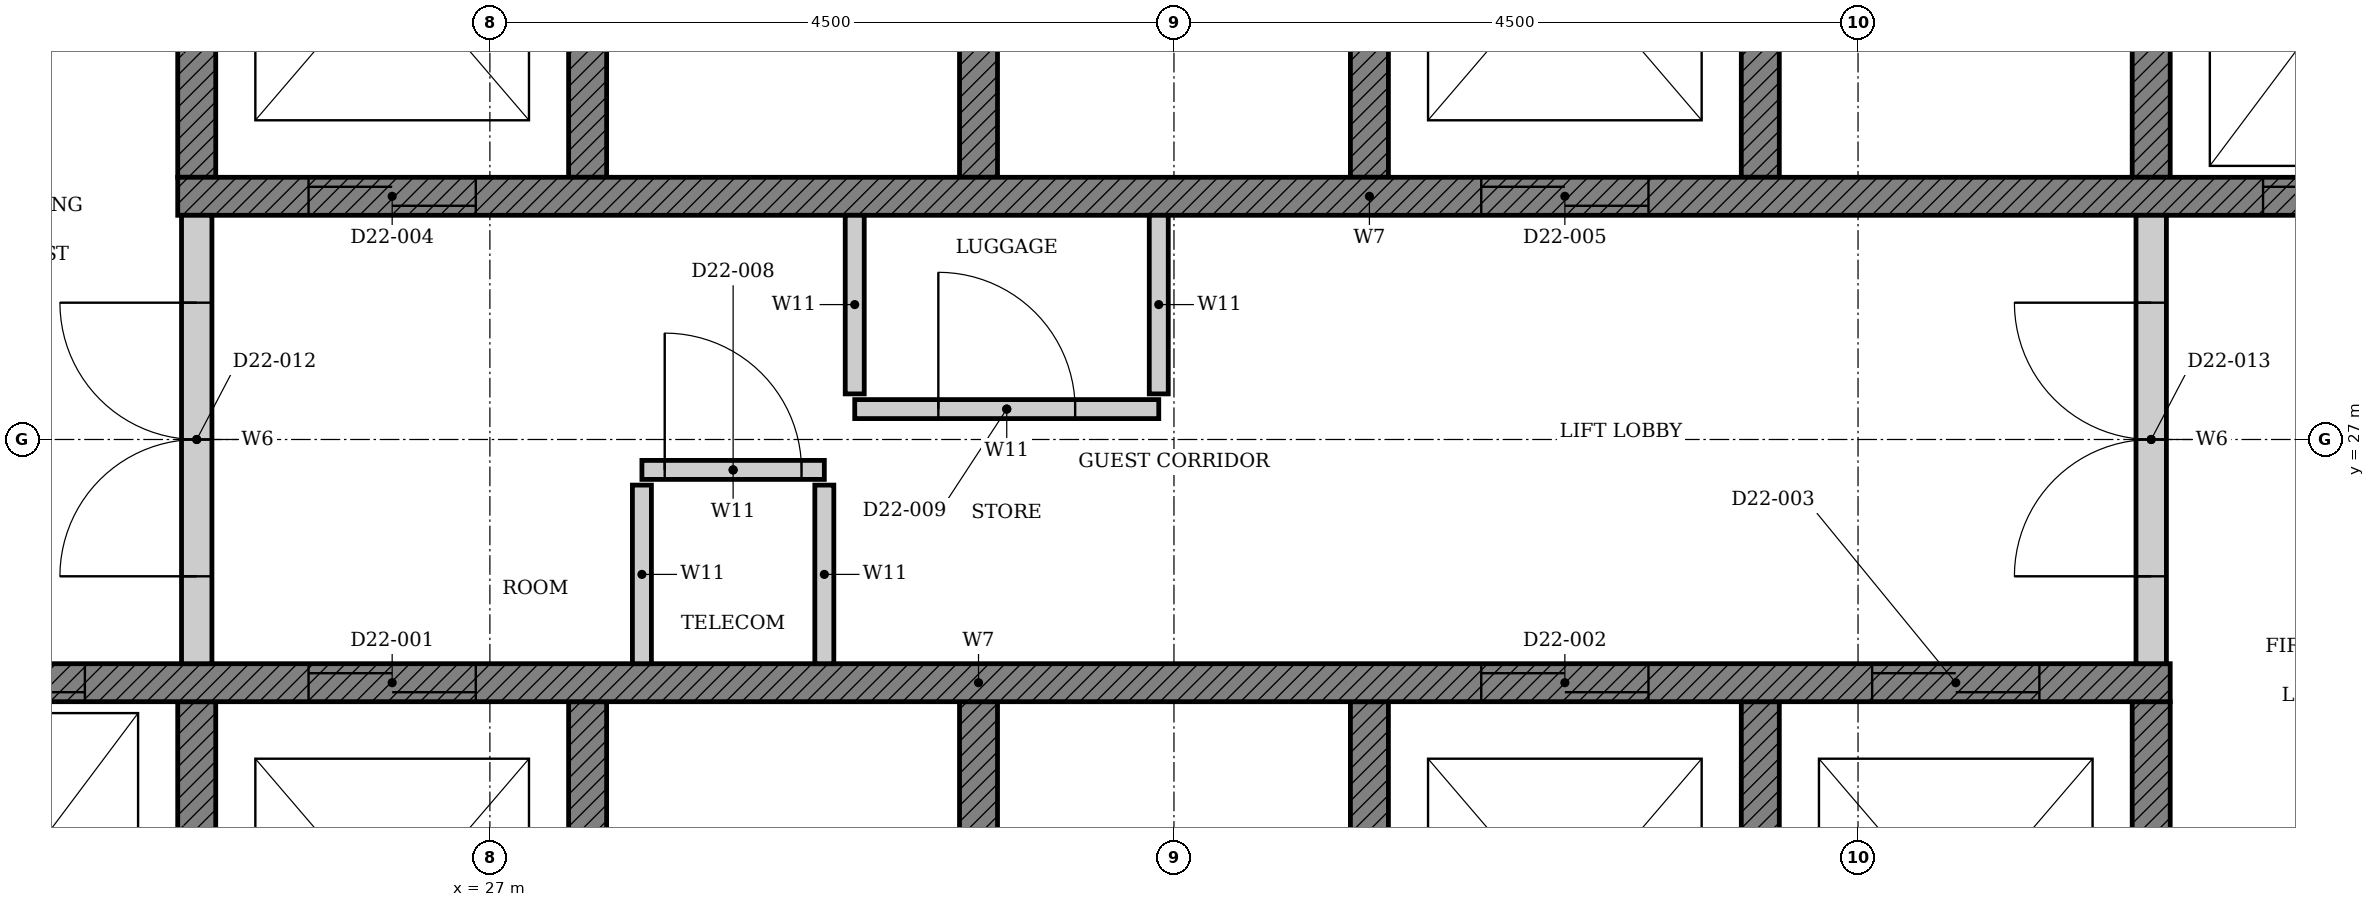
"""IFC4 building model, lengths in metres.
Left out: names, types, materials, properties, quantities, classifications, styles, units other than length and angle.
Written with IfcOpenShell. Run it as: python <this file> out.ifc"""

import sys

from ifc_helpers import new_model, si_unit, direction, frame, frame_2d, origin, place, context, subcontext, project, spatial, polyline, rectangle, outline, extrude, element, fill, save


model = new_model("IFC4")
c1 = context("Model", 3, precision=1e-05, world=origin(), true_north=direction((0.0, 1.0)))
c2 = subcontext(c1, "Body", "Model", "MODEL_VIEW")
j1 = project(units=[si_unit("LENGTHUNIT", "METRE"), si_unit("PLANEANGLEUNIT", "RADIAN")], contexts=[c1])
p1 = place(None, origin())
s1 = spatial("IfcSite", under=j1, at=p1, CompositionType="ELEMENT")
p2 = place(p1, origin())
s2 = spatial("IfcBuilding", under=s1, at=p2, CompositionType="ELEMENT")
p3 = place(p2, frame((0.0, 0.0, 92.4)))
s3 = spatial("IfcBuildingStorey", under=s2, at=p3, CompositionType="ELEMENT", Elevation=92.4)
p4 = place(p3, origin())
e1 = element("IfcWall", 1, at=p4, inside=s3, PredefinedType="SHEAR", context=c2, shape_type="SweptSolid", body=[
    extrude(outline(polyline([(22.375, 22.35), (38.053, 22.35), (38.053, 25.275), (37.803, 25.275), (37.803, 22.65), (35.482, 22.65), (35.482, 25.275), (35.232, 25.275), (35.232, 22.65), (32.911, 22.65), (32.911, 25.275), (32.661, 25.275), (32.661, 22.65), (30.339, 22.65), (30.339, 25.275), (30.089, 25.275), (30.089, 22.65), (27.768, 22.65), (27.768, 25.275), (27.518, 25.275), (27.518, 22.65), (25.197, 22.65), (25.197, 25.275), (24.947, 25.275), (24.947, 22.65), (22.625, 22.65), (22.625, 25.275), (22.375, 25.275), (22.375, 22.35)])), origin(), (0.0, 0.0, 1.0), 3.2),
])
p5 = place(p3, origin())
e2 = element("IfcWall", 2, at=p5, inside=s3, PredefinedType="SHEAR", context=c2, shape_type="SweptSolid", body=[
    extrude(outline(polyline([(24.947, 28.725), (25.197, 28.725), (25.197, 31.35), (27.518, 31.35), (27.518, 28.725), (27.768, 28.725), (27.768, 31.35), (30.089, 31.35), (30.089, 28.725), (30.339, 28.725), (30.339, 31.35), (32.661, 31.35), (32.661, 28.725), (32.911, 28.725), (32.911, 31.35), (35.232, 31.35), (35.232, 28.725), (35.482, 28.725), (35.482, 31.35), (37.803, 31.35), (37.803, 28.725), (38.053, 28.725), (38.053, 31.35), (40.375, 31.35), (40.375, 28.725), (40.625, 28.725), (40.625, 31.65), (24.947, 31.65), (24.947, 28.725)])), origin(), (0.0, 0.0, 1.0), 3.2),
])
p6 = place(p3, frame((22.375, 25.4, 0.0), z_axis=(0.0, 0.0, 1.0), x_axis=(1.0, 0.0, 0.0)))
e3 = element("IfcWall", 3, at=p6, inside=s3, PredefinedType="SHEAR", context=c2, shape_type="SweptSolid", body=[
    extrude(rectangle(XDim=15.678, YDim=0.25, at=frame_2d((7.839, 0.0))), origin(), (0.0, 0.0, 1.0), 3.2),
])
p7 = place(p6, frame((3.432, 0.0, 0.0)))
e4 = element("IfcOpeningElement", 4, at=p7, cuts=e3, PredefinedType="OPENING", context=c2, shape_type="SweptSolid", body=[
    extrude(rectangle(XDim=1.1, YDim=2.1, at=frame_2d((0.55, 1.05))), frame((0.0, 0.135, 0.0), z_axis=(0.0, -1.0, 0.0), x_axis=(1.0, 0.0, 0.0)), (0.0, 0.0, 1.0), 0.27),
])
p8 = place(p6, frame((11.146, 0.0, 0.0)))
e5 = element("IfcOpeningElement", 5, at=p8, cuts=e3, PredefinedType="OPENING", context=c2, shape_type="SweptSolid", body=[
    extrude(rectangle(XDim=1.1, YDim=2.1, at=frame_2d((0.55, 1.05))), frame((0.0, 0.135, 0.0), z_axis=(0.0, -1.0, 0.0), x_axis=(1.0, 0.0, 0.0)), (0.0, 0.0, 1.0), 0.27),
])
p9 = place(p6, frame((13.718, 0.0, 0.0)))
e6 = element("IfcOpeningElement", 6, at=p9, cuts=e3, PredefinedType="OPENING", context=c2, shape_type="SweptSolid", body=[
    extrude(rectangle(XDim=1.1, YDim=2.1, at=frame_2d((0.55, 1.05))), frame((0.0, 0.135, 0.0), z_axis=(0.0, -1.0, 0.0), x_axis=(1.0, 0.0, 0.0)), (0.0, 0.0, 1.0), 0.27),
])
p10 = place(p6, frame((0.861, 0.0, 0.0)))
e7 = element("IfcOpeningElement", 7, at=p10, cuts=e3, PredefinedType="OPENING", context=c2, shape_type="SweptSolid", body=[
    extrude(rectangle(XDim=1.1, YDim=2.1, at=frame_2d((0.55, 1.05))), frame((0.0, 0.135, 0.0), z_axis=(0.0, -1.0, 0.0), x_axis=(1.0, 0.0, 0.0)), (0.0, 0.0, 1.0), 0.27),
])
p11 = place(p3, frame((24.947, 28.6, 0.0), z_axis=(0.0, 0.0, 1.0), x_axis=(1.0, 0.0, 0.0)))
e8 = element("IfcWall", 8, at=p11, inside=s3, PredefinedType="SHEAR", context=c2, shape_type="SweptSolid", body=[
    extrude(rectangle(XDim=15.678, YDim=0.25, at=frame_2d((7.839, 0.0))), origin(), (0.0, 0.0, 1.0), 3.2),
])
p12 = place(p11, frame((0.861, 0.0, 0.0)))
e9 = element("IfcOpeningElement", 9, at=p12, cuts=e8, PredefinedType="OPENING", context=c2, shape_type="SweptSolid", body=[
    extrude(rectangle(XDim=1.1, YDim=2.1, at=frame_2d((0.55, 1.05))), frame((0.0, 0.135, 0.0), z_axis=(0.0, -1.0, 0.0), x_axis=(1.0, 0.0, 0.0)), (0.0, 0.0, 1.0), 0.27),
])
p13 = place(p11, frame((8.575, 0.0, 0.0)))
e10 = element("IfcOpeningElement", 10, at=p13, cuts=e8, PredefinedType="OPENING", context=c2, shape_type="SweptSolid", body=[
    extrude(rectangle(XDim=1.1, YDim=2.1, at=frame_2d((0.55, 1.05))), frame((0.0, 0.135, 0.0), z_axis=(0.0, -1.0, 0.0), x_axis=(1.0, 0.0, 0.0)), (0.0, 0.0, 1.0), 0.27),
])
p14 = place(p11, frame((13.718, 0.0, 0.0)))
e11 = element("IfcOpeningElement", 11, at=p14, cuts=e8, PredefinedType="OPENING", context=c2, shape_type="SweptSolid", body=[
    extrude(rectangle(XDim=1.1, YDim=2.1, at=frame_2d((0.55, 1.05))), frame((0.0, 0.135, 0.0), z_axis=(0.0, -1.0, 0.0), x_axis=(1.0, 0.0, 0.0)), (0.0, 0.0, 1.0), 0.27),
])
p15 = place(p3, frame((28.0, 26.8, 0.0), z_axis=(0.0, 0.0, 1.0), x_axis=(1.0, 0.0, 0.0)))
e12 = element("IfcWall", 12, at=p15, inside=s3, PredefinedType="PARTITIONING", context=c2, shape_type="SweptSolid", body=[
    extrude(rectangle(XDim=1.2, YDim=0.125, at=frame_2d((0.6, 0.0))), origin(), (0.0, 0.0, 1.0), 3.2),
])
p16 = place(p15, frame((0.15, 0.0, 0.0)))
e13 = element("IfcOpeningElement", 13, at=p16, cuts=e12, PredefinedType="OPENING", context=c2, shape_type="SweptSolid", body=[
    extrude(rectangle(XDim=0.9, YDim=2.1, at=frame_2d((0.45, 1.05))), frame((0.0, 0.073, 0.0), z_axis=(0.0, -1.0, 0.0), x_axis=(1.0, 0.0, 0.0)), (0.0, 0.0, 1.0), 0.145),
])
for number, where, z_axis, x_axis in (
    (14, (28.0, 25.525, 0.0), (0.0, 0.0, 1.0), (0.0, 1.0, 0.0)),
    (15, (29.2, 25.525, 0.0), (0.0, 0.0, 1.0), (0.0, 1.0, 0.0)),
):
    element("IfcWall", number, at=place(p3, frame(where, z_axis=z_axis, x_axis=x_axis)), inside=s3, PredefinedType="PARTITIONING", context=c2, shape_type="SweptSolid", body=[
        extrude(rectangle(XDim=1.175, YDim=0.125, at=frame_2d((0.587, 0.0))), origin(), (0.0, 0.0, 1.0), 3.2),
    ])
p17 = place(p3, frame((29.4, 27.2, 0.0), z_axis=(0.0, 0.0, 1.0), x_axis=(1.0, 0.0, 0.0)))
e16 = element("IfcWall", 16, at=p17, inside=s3, PredefinedType="PARTITIONING", context=c2, shape_type="SweptSolid", body=[
    extrude(rectangle(XDim=2.0, YDim=0.125, at=frame_2d((1.0, 0.0))), origin(), (0.0, 0.0, 1.0), 3.2),
])
p18 = place(p17, frame((0.55, 0.0, 0.0)))
e17 = element("IfcOpeningElement", 17, at=p18, cuts=e16, PredefinedType="OPENING", context=c2, shape_type="SweptSolid", body=[
    extrude(rectangle(XDim=0.9, YDim=2.1, at=frame_2d((0.45, 1.05))), frame((0.0, 0.073, 0.0), z_axis=(0.0, -1.0, 0.0), x_axis=(1.0, 0.0, 0.0)), (0.0, 0.0, 1.0), 0.145),
])
for number, where, z_axis, x_axis in (
    (18, (29.4, 28.475, 0.0), (0.0, 0.0, 1.0), (0.0, -1.0, 0.0)),
    (19, (31.4, 28.475, 0.0), (0.0, 0.0, 1.0), (0.0, -1.0, 0.0)),
):
    element("IfcWall", number, at=place(p3, frame(where, z_axis=z_axis, x_axis=x_axis)), inside=s3, PredefinedType="PARTITIONING", context=c2, shape_type="SweptSolid", body=[
        extrude(rectangle(XDim=1.175, YDim=0.125, at=frame_2d((0.587, 0.0))), origin(), (0.0, 0.0, 1.0), 3.2),
    ])
p19 = place(p3, frame((25.072, 25.525, 0.0), z_axis=(0.0, 0.0, 1.0), x_axis=(0.0, 1.0, 0.0)))
e20 = element("IfcWall", 20, at=p19, inside=s3, PredefinedType="PARTITIONING", context=c2, shape_type="SweptSolid", body=[
    extrude(rectangle(XDim=2.95, YDim=0.2, at=frame_2d((1.475, 0.0))), origin(), (0.0, 0.0, 1.0), 3.2),
])
p20 = place(p19, frame((0.575, 0.0, 0.0)))
e21 = element("IfcOpeningElement", 21, at=p20, cuts=e20, PredefinedType="OPENING", context=c2, shape_type="SweptSolid", body=[
    extrude(rectangle(XDim=1.8, YDim=2.1, at=frame_2d((0.9, 1.05))), frame((0.0, 0.11, 0.0), z_axis=(0.0, -1.0, 0.0), x_axis=(1.0, 0.0, 0.0)), (0.0, 0.0, 1.0), 0.22),
])
p21 = place(p3, frame((37.928, 25.525, 0.0), z_axis=(0.0, 0.0, 1.0), x_axis=(0.0, 1.0, 0.0)))
e22 = element("IfcWall", 22, at=p21, inside=s3, PredefinedType="PARTITIONING", context=c2, shape_type="SweptSolid", body=[
    extrude(rectangle(XDim=2.95, YDim=0.2, at=frame_2d((1.475, 0.0))), origin(), (0.0, 0.0, 1.0), 3.2),
])
p22 = place(p21, frame((0.575, 0.0, 0.0)))
e23 = element("IfcOpeningElement", 23, at=p22, cuts=e22, PredefinedType="OPENING", context=c2, shape_type="SweptSolid", body=[
    extrude(rectangle(XDim=1.8, YDim=2.1, at=frame_2d((0.9, 1.05))), frame((0.0, 0.11, 0.0), z_axis=(0.0, -1.0, 0.0), x_axis=(1.0, 0.0, 0.0)), (0.0, 0.0, 1.0), 0.22),
])
p23 = place(p7, origin())
e24 = element("IfcDoor", 24, at=p23, inside=s3, OperationType="DOUBLE_DOOR_SLIDING", PredefinedType="DOOR", context=c2, shape_type="SweptSolid", body=[
    extrude(rectangle(XDim=1.1, YDim=2.1, at=frame_2d((0.55, 1.05))), frame((0.0, 0.025, 0.0), z_axis=(0.0, -1.0, 0.0), x_axis=(1.0, 0.0, 0.0)), (0.0, 0.0, 1.0), 0.05),
])
fill(e4, e24)
p24 = place(p8, origin())
e25 = element("IfcDoor", 25, at=p24, inside=s3, OperationType="DOUBLE_DOOR_SLIDING", PredefinedType="DOOR", context=c2, shape_type="SweptSolid", body=[
    extrude(rectangle(XDim=1.1, YDim=2.1, at=frame_2d((0.55, 1.05))), frame((0.0, 0.025, 0.0), z_axis=(0.0, -1.0, 0.0), x_axis=(1.0, 0.0, 0.0)), (0.0, 0.0, 1.0), 0.05),
])
fill(e5, e25)
p25 = place(p9, origin())
e26 = element("IfcDoor", 26, at=p25, inside=s3, OperationType="DOUBLE_DOOR_SLIDING", PredefinedType="DOOR", context=c2, shape_type="SweptSolid", body=[
    extrude(rectangle(XDim=1.1, YDim=2.1, at=frame_2d((0.55, 1.05))), frame((0.0, 0.025, 0.0), z_axis=(0.0, -1.0, 0.0), x_axis=(1.0, 0.0, 0.0)), (0.0, 0.0, 1.0), 0.05),
])
fill(e6, e26)
p26 = place(p12, origin())
e27 = element("IfcDoor", 27, at=p26, inside=s3, OperationType="DOUBLE_DOOR_SLIDING", PredefinedType="DOOR", context=c2, shape_type="SweptSolid", body=[
    extrude(rectangle(XDim=1.1, YDim=2.1, at=frame_2d((0.55, 1.05))), frame((0.0, 0.025, 0.0), z_axis=(0.0, -1.0, 0.0), x_axis=(1.0, 0.0, 0.0)), (0.0, 0.0, 1.0), 0.05),
])
fill(e9, e27)
p27 = place(p13, origin())
e28 = element("IfcDoor", 28, at=p27, inside=s3, OperationType="DOUBLE_DOOR_SLIDING", PredefinedType="DOOR", context=c2, shape_type="SweptSolid", body=[
    extrude(rectangle(XDim=1.1, YDim=2.1, at=frame_2d((0.55, 1.05))), frame((0.0, 0.025, 0.0), z_axis=(0.0, -1.0, 0.0), x_axis=(1.0, 0.0, 0.0)), (0.0, 0.0, 1.0), 0.05),
])
fill(e10, e28)
p28 = place(p10, origin())
e29 = element("IfcDoor", 29, at=p28, inside=s3, OperationType="DOUBLE_DOOR_SLIDING", PredefinedType="DOOR", context=c2, shape_type="SweptSolid", body=[
    extrude(rectangle(XDim=1.1, YDim=2.1, at=frame_2d((0.55, 1.05))), frame((0.0, 0.025, 0.0), z_axis=(0.0, -1.0, 0.0), x_axis=(1.0, 0.0, 0.0)), (0.0, 0.0, 1.0), 0.05),
])
fill(e7, e29)
p29 = place(p14, origin())
e30 = element("IfcDoor", 30, at=p29, inside=s3, OperationType="DOUBLE_DOOR_SLIDING", PredefinedType="DOOR", context=c2, shape_type="SweptSolid", body=[
    extrude(rectangle(XDim=1.1, YDim=2.1, at=frame_2d((0.55, 1.05))), frame((0.0, 0.025, 0.0), z_axis=(0.0, -1.0, 0.0), x_axis=(1.0, 0.0, 0.0)), (0.0, 0.0, 1.0), 0.05),
])
fill(e11, e30)
p30 = place(p16, origin())
e31 = element("IfcDoor", 31, at=p30, inside=s3, OperationType="SINGLE_SWING_LEFT", PredefinedType="DOOR", context=c2, shape_type="SweptSolid", body=[
    extrude(rectangle(XDim=0.9, YDim=2.1, at=frame_2d((0.45, 1.05))), frame((0.0, 0.025, 0.0), z_axis=(0.0, -1.0, 0.0), x_axis=(1.0, 0.0, 0.0)), (0.0, 0.0, 1.0), 0.05),
])
fill(e13, e31)
p31 = place(p18, origin())
e32 = element("IfcDoor", 32, at=p31, inside=s3, OperationType="SINGLE_SWING_LEFT", PredefinedType="DOOR", context=c2, shape_type="SweptSolid", body=[
    extrude(rectangle(XDim=0.9, YDim=2.1, at=frame_2d((0.45, 1.05))), frame((0.0, 0.025, 0.0), z_axis=(0.0, -1.0, 0.0), x_axis=(1.0, 0.0, 0.0)), (0.0, 0.0, 1.0), 0.05),
])
fill(e17, e32)
p32 = place(p20, origin())
e33 = element("IfcDoor", 33, at=p32, inside=s3, OperationType="DOUBLE_DOOR_SINGLE_SWING", PredefinedType="DOOR", context=c2, shape_type="SweptSolid", body=[
    extrude(rectangle(XDim=1.8, YDim=2.1, at=frame_2d((0.9, 1.05))), frame((0.0, 0.025, 0.0), z_axis=(0.0, -1.0, 0.0), x_axis=(1.0, 0.0, 0.0)), (0.0, 0.0, 1.0), 0.05),
])
fill(e21, e33)
p33 = place(p22, origin())
e34 = element("IfcDoor", 34, at=p33, inside=s3, OperationType="DOUBLE_DOOR_SINGLE_SWING", PredefinedType="DOOR", context=c2, shape_type="SweptSolid", body=[
    extrude(rectangle(XDim=1.8, YDim=2.1, at=frame_2d((0.9, 1.05))), frame((0.0, 0.025, 0.0), z_axis=(0.0, -1.0, 0.0), x_axis=(1.0, 0.0, 0.0)), (0.0, 0.0, 1.0), 0.05),
])
fill(e23, e34)
save(model, sys.argv[1])
